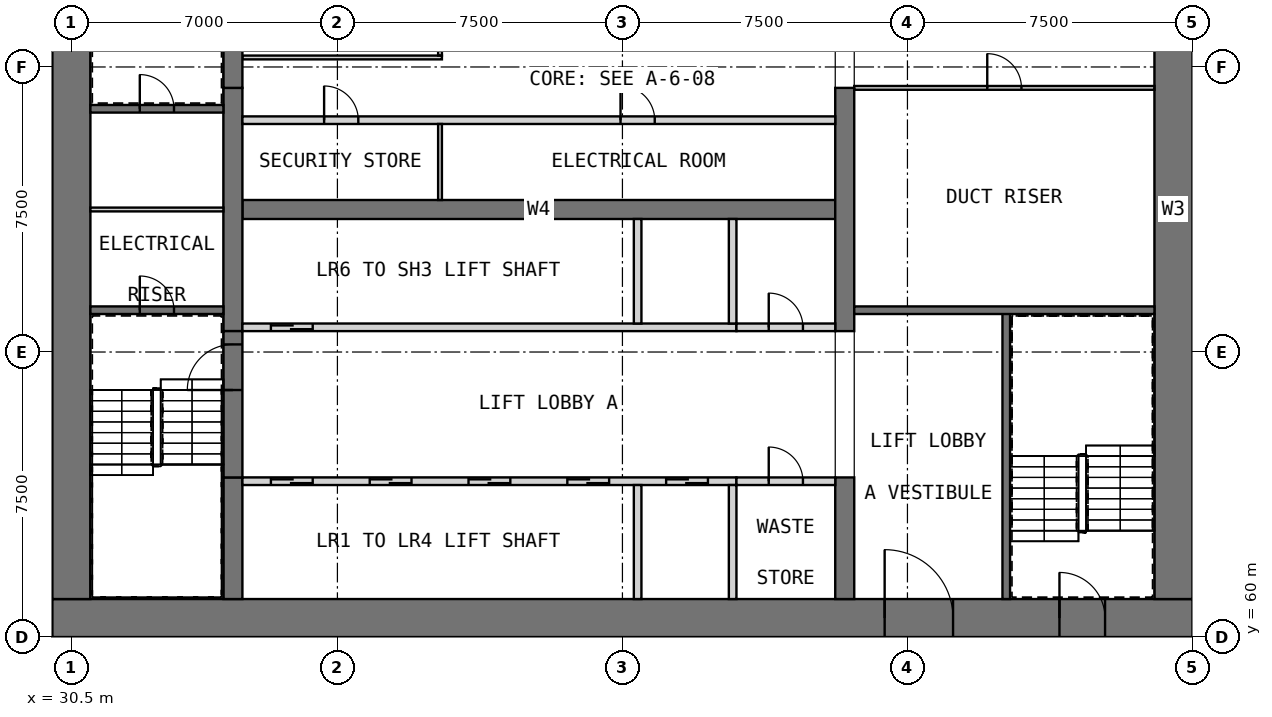
"""IFC4 building model, lengths in metres.
Left out: names, types, materials, properties, quantities, classifications, styles, units other than length and angle.
Written with IfcOpenShell. Run it as: python <this file> out.ifc"""

import sys

from ifc_helpers import new_model, si_unit, direction, frame, frame_2d, origin, place, context, subcontext, project, spatial, rectangle, extrude, element, fill, save


model = new_model("IFC4")
c1 = context("Model", 3, precision=1e-05, world=origin(), true_north=direction((0.0, 1.0)))
c2 = subcontext(c1, "Body", "Model", "MODEL_VIEW")
j1 = project(units=[si_unit("LENGTHUNIT", "METRE"), si_unit("PLANEANGLEUNIT", "RADIAN")], contexts=[c1])
p1 = place(None, origin())
s1 = spatial("IfcSite", under=j1, at=p1, CompositionType="ELEMENT")
p2 = place(p1, origin())
s2 = spatial("IfcBuilding", under=s1, at=p2, CompositionType="ELEMENT")
p3 = place(p2, frame((0.0, 0.0, 29.0)))
s3 = spatial("IfcBuildingStorey", under=s2, at=p3, CompositionType="ELEMENT", Elevation=29.0)
p4 = place(p3, frame((30.0, 60.5, 0.0), z_axis=(0.0, 0.0, 1.0), x_axis=(1.0, 0.0, 0.0)))
e1 = element("IfcWall", 1, at=p4, inside=s3, PredefinedType="SHEAR", context=c2, shape_type="SweptSolid", body=[
    extrude(rectangle(XDim=30.0, YDim=1.0, at=frame_2d((15.0, 0.0))), origin(), (0.0, 0.0, 1.0), 5.0),
])
p5 = place(p4, frame((21.9, 0.0, 0.0)))
e2 = element("IfcOpeningElement", 2, at=p5, cuts=e1, PredefinedType="OPENING", context=c2, shape_type="SweptSolid", body=[
    extrude(rectangle(XDim=1.8, YDim=2.1, at=frame_2d((0.9, 1.05))), frame((0.0, 0.51, 0.0), z_axis=(0.0, -1.0, 0.0), x_axis=(1.0, 0.0, 0.0)), (0.0, 0.0, 1.0), 1.02),
])
p6 = place(p4, frame((26.5, 0.0, 0.0)))
e3 = element("IfcOpeningElement", 3, at=p6, cuts=e1, PredefinedType="OPENING", context=c2, shape_type="SweptSolid", body=[
    extrude(rectangle(XDim=1.2, YDim=2.1, at=frame_2d((0.6, 1.05))), frame((0.0, 0.51, 0.0), z_axis=(0.0, -1.0, 0.0), x_axis=(1.0, 0.0, 0.0)), (0.0, 0.0, 1.0), 1.02),
])
p7 = place(p3, frame((30.5, 61.0, 0.0), z_axis=(0.0, 0.0, 1.0), x_axis=(0.0, 1.0, 0.0)))
e4 = element("IfcWall", 4, at=p7, inside=s3, PredefinedType="SHEAR", context=c2, shape_type="SweptSolid", body=[
    extrude(rectangle(XDim=20.5, YDim=1.0, at=frame_2d((10.25, 0.0))), origin(), (0.0, 0.0, 1.0), 5.0),
])
p8 = place(p3, frame((59.5, 61.0, 0.0), z_axis=(0.0, 0.0, 1.0), x_axis=(0.0, 1.0, 0.0)))
e5 = element("IfcWall", 5, at=p8, inside=s3, PredefinedType="SHEAR", context=c2, shape_type="SweptSolid", body=[
    extrude(rectangle(XDim=20.5, YDim=1.0, at=frame_2d((10.25, 0.0))), origin(), (0.0, 0.0, 1.0), 5.0),
])
p9 = place(p8, frame((14.5, 0.0, 0.0)))
e6 = element("IfcOpeningElement", 6, at=p9, cuts=e5, PredefinedType="OPENING", context=c2, shape_type="SweptSolid", body=[
    extrude(rectangle(XDim=1.8, YDim=2.1, at=frame_2d((0.9, 1.05))), frame((0.0, 0.51, 0.0), z_axis=(0.0, -1.0, 0.0), x_axis=(1.0, 0.0, 0.0)), (0.0, 0.0, 1.0), 1.02),
])
p10 = place(p3, frame((35.0, 71.25, 0.0), z_axis=(0.0, 0.0, 1.0), x_axis=(1.0, 0.0, 0.0)))
e7 = element("IfcWall", 7, at=p10, inside=s3, PredefinedType="SHEAR", context=c2, shape_type="SweptSolid", body=[
    extrude(rectangle(XDim=15.6, YDim=0.5, at=frame_2d((7.8, 0.0))), origin(), (0.0, 0.0, 1.0), 5.0),
])
p11 = place(p3, frame((34.75, 61.0, 0.0), z_axis=(0.0, 0.0, 1.0), x_axis=(0.0, 1.0, 0.0)))
e8 = element("IfcWall", 8, at=p11, inside=s3, PredefinedType="SHEAR", context=c2, shape_type="SweptSolid", body=[
    extrude(rectangle(XDim=3.2, YDim=0.5, at=frame_2d((1.6, 0.0))), origin(), (0.0, 0.0, 1.0), 5.0),
])
p12 = place(p3, frame((34.75, 68.05, 0.0), z_axis=(0.0, 0.0, 1.0), x_axis=(0.0, 1.0, 0.0)))
e9 = element("IfcWall", 9, at=p12, inside=s3, PredefinedType="SHEAR", context=c2, shape_type="SweptSolid", body=[
    extrude(rectangle(XDim=6.4, YDim=0.5, at=frame_2d((3.2, 0.0))), origin(), (0.0, 0.0, 1.0), 5.0),
])
p13 = place(p3, frame((50.85, 61.0, 0.0), z_axis=(0.0, 0.0, 1.0), x_axis=(0.0, 1.0, 0.0)))
e10 = element("IfcWall", 10, at=p13, inside=s3, PredefinedType="SHEAR", context=c2, shape_type="SweptSolid", body=[
    extrude(rectangle(XDim=3.2, YDim=0.5, at=frame_2d((1.6, 0.0))), origin(), (0.0, 0.0, 1.0), 5.0),
])
p14 = place(p3, frame((50.85, 68.05, 0.0), z_axis=(0.0, 0.0, 1.0), x_axis=(0.0, 1.0, 0.0)))
e11 = element("IfcWall", 11, at=p14, inside=s3, PredefinedType="SHEAR", context=c2, shape_type="SweptSolid", body=[
    extrude(rectangle(XDim=6.4, YDim=0.5, at=frame_2d((3.2, 0.0))), origin(), (0.0, 0.0, 1.0), 5.0),
])
p15 = place(p3, frame((35.0, 64.1, 0.0), z_axis=(0.0, 0.0, 1.0), x_axis=(1.0, 0.0, 0.0)))
e12 = element("IfcWall", 12, at=p15, inside=s3, PredefinedType="SOLIDWALL", context=c2, shape_type="SweptSolid", body=[
    extrude(rectangle(XDim=13.0, YDim=0.2, at=frame_2d((6.5, 0.0))), origin(), (0.0, 0.0, 1.0), 5.0),
])
p16 = place(p15, frame((0.75, 0.0, 0.0)))
e13 = element("IfcOpeningElement", 13, at=p16, cuts=e12, PredefinedType="OPENING", context=c2, shape_type="SweptSolid", body=[
    extrude(rectangle(XDim=1.1, YDim=2.1, at=frame_2d((0.55, 1.05))), frame((0.0, 0.11, 0.0), z_axis=(0.0, -1.0, 0.0), x_axis=(1.0, 0.0, 0.0)), (0.0, 0.0, 1.0), 0.22),
])
p17 = place(p15, frame((3.35, 0.0, 0.0)))
e14 = element("IfcOpeningElement", 14, at=p17, cuts=e12, PredefinedType="OPENING", context=c2, shape_type="SweptSolid", body=[
    extrude(rectangle(XDim=1.1, YDim=2.1, at=frame_2d((0.55, 1.05))), frame((0.0, 0.11, 0.0), z_axis=(0.0, -1.0, 0.0), x_axis=(1.0, 0.0, 0.0)), (0.0, 0.0, 1.0), 0.22),
])
p18 = place(p15, frame((5.95, 0.0, 0.0)))
e15 = element("IfcOpeningElement", 15, at=p18, cuts=e12, PredefinedType="OPENING", context=c2, shape_type="SweptSolid", body=[
    extrude(rectangle(XDim=1.1, YDim=2.1, at=frame_2d((0.55, 1.05))), frame((0.0, 0.11, 0.0), z_axis=(0.0, -1.0, 0.0), x_axis=(1.0, 0.0, 0.0)), (0.0, 0.0, 1.0), 0.22),
])
p19 = place(p15, frame((8.55, 0.0, 0.0)))
e16 = element("IfcOpeningElement", 16, at=p19, cuts=e12, PredefinedType="OPENING", context=c2, shape_type="SweptSolid", body=[
    extrude(rectangle(XDim=1.1, YDim=2.1, at=frame_2d((0.55, 1.05))), frame((0.0, 0.11, 0.0), z_axis=(0.0, -1.0, 0.0), x_axis=(1.0, 0.0, 0.0)), (0.0, 0.0, 1.0), 0.22),
])
p20 = place(p15, frame((11.15, 0.0, 0.0)))
e17 = element("IfcOpeningElement", 17, at=p20, cuts=e12, PredefinedType="OPENING", context=c2, shape_type="SweptSolid", body=[
    extrude(rectangle(XDim=1.1, YDim=2.1, at=frame_2d((0.55, 1.05))), frame((0.0, 0.11, 0.0), z_axis=(0.0, -1.0, 0.0), x_axis=(1.0, 0.0, 0.0)), (0.0, 0.0, 1.0), 0.22),
])
for number, where, z_axis, x_axis in (
    (18, (45.4, 61.0, 0.0), (0.0, 0.0, 1.0), (0.0, 1.0, 0.0)),
    (19, (47.9, 61.0, 0.0), (0.0, 0.0, 1.0), (0.0, 1.0, 0.0)),
):
    element("IfcWall", number, at=place(p3, frame(where, z_axis=z_axis, x_axis=x_axis)), inside=s3, PredefinedType="SOLIDWALL", context=c2, shape_type="SweptSolid", body=[
        extrude(rectangle(XDim=3.0, YDim=0.2, at=frame_2d((1.5, 0.0))), origin(), (0.0, 0.0, 1.0), 5.0),
    ])
p21 = place(p3, frame((48.0, 64.1, 0.0), z_axis=(0.0, 0.0, 1.0), x_axis=(1.0, 0.0, 0.0)))
e20 = element("IfcWall", 20, at=p21, inside=s3, PredefinedType="PARTITIONING", context=c2, shape_type="SweptSolid", body=[
    extrude(rectangle(XDim=2.6, YDim=0.2, at=frame_2d((1.3, 0.0))), origin(), (0.0, 0.0, 1.0), 4.75),
])
p22 = place(p21, frame((0.85, 0.0, 0.0)))
e21 = element("IfcOpeningElement", 21, at=p22, cuts=e20, PredefinedType="OPENING", context=c2, shape_type="SweptSolid", body=[
    extrude(rectangle(XDim=0.9, YDim=2.1, at=frame_2d((0.45, 1.05))), frame((0.0, 0.11, 0.0), z_axis=(0.0, -1.0, 0.0), x_axis=(1.0, 0.0, 0.0)), (0.0, 0.0, 1.0), 0.22),
])
p23 = place(p3, frame((35.0, 68.15, 0.0), z_axis=(0.0, 0.0, 1.0), x_axis=(1.0, 0.0, 0.0)))
e22 = element("IfcWall", 22, at=p23, inside=s3, PredefinedType="SOLIDWALL", context=c2, shape_type="SweptSolid", body=[
    extrude(rectangle(XDim=13.0, YDim=0.2, at=frame_2d((6.5, 0.0))), origin(), (0.0, 0.0, 1.0), 5.0),
])
p24 = place(p23, frame((0.75, 0.0, 0.0)))
e23 = element("IfcOpeningElement", 23, at=p24, cuts=e22, PredefinedType="OPENING", context=c2, shape_type="SweptSolid", body=[
    extrude(rectangle(XDim=1.1, YDim=2.1, at=frame_2d((0.55, 1.05))), frame((0.0, 0.11, 0.0), z_axis=(0.0, -1.0, 0.0), x_axis=(1.0, 0.0, 0.0)), (0.0, 0.0, 1.0), 0.22),
])
for number, where, z_axis, x_axis in (
    (24, (45.4, 68.25, 0.0), (0.0, 0.0, 1.0), (0.0, 1.0, 0.0)),
    (25, (47.9, 68.25, 0.0), (0.0, 0.0, 1.0), (0.0, 1.0, 0.0)),
):
    element("IfcWall", number, at=place(p3, frame(where, z_axis=z_axis, x_axis=x_axis)), inside=s3, PredefinedType="SOLIDWALL", context=c2, shape_type="SweptSolid", body=[
        extrude(rectangle(XDim=2.75, YDim=0.2, at=frame_2d((1.375, 0.0))), origin(), (0.0, 0.0, 1.0), 5.0),
    ])
p25 = place(p3, frame((48.0, 68.15, 0.0), z_axis=(0.0, 0.0, 1.0), x_axis=(1.0, 0.0, 0.0)))
e26 = element("IfcWall", 26, at=p25, inside=s3, PredefinedType="PARTITIONING", context=c2, shape_type="SweptSolid", body=[
    extrude(rectangle(XDim=2.6, YDim=0.2, at=frame_2d((1.3, 0.0))), origin(), (0.0, 0.0, 1.0), 4.75),
])
p26 = place(p25, frame((0.85, 0.0, 0.0)))
e27 = element("IfcOpeningElement", 27, at=p26, cuts=e26, PredefinedType="OPENING", context=c2, shape_type="SweptSolid", body=[
    extrude(rectangle(XDim=0.9, YDim=2.1, at=frame_2d((0.45, 1.05))), frame((0.0, 0.11, 0.0), z_axis=(0.0, -1.0, 0.0), x_axis=(1.0, 0.0, 0.0)), (0.0, 0.0, 1.0), 0.22),
])
p27 = place(p3, frame((35.0, 73.6, 0.0), z_axis=(0.0, 0.0, 1.0), x_axis=(1.0, 0.0, 0.0)))
e28 = element("IfcWall", 28, at=p27, inside=s3, PredefinedType="PARTITIONING", context=c2, shape_type="SweptSolid", body=[
    extrude(rectangle(XDim=15.6, YDim=0.2, at=frame_2d((7.8, 0.0))), origin(), (0.0, 0.0, 1.0), 4.75),
])
p28 = place(p27, frame((2.15, 0.0, 0.0)))
e29 = element("IfcOpeningElement", 29, at=p28, cuts=e28, PredefinedType="OPENING", context=c2, shape_type="SweptSolid", body=[
    extrude(rectangle(XDim=0.9, YDim=2.1, at=frame_2d((0.45, 1.05))), frame((0.0, 0.11, 0.0), z_axis=(0.0, -1.0, 0.0), x_axis=(1.0, 0.0, 0.0)), (0.0, 0.0, 1.0), 0.22),
])
p29 = place(p27, frame((9.95, 0.0, 0.0)))
e30 = element("IfcOpeningElement", 30, at=p29, cuts=e28, PredefinedType="OPENING", context=c2, shape_type="SweptSolid", body=[
    extrude(rectangle(XDim=0.9, YDim=2.1, at=frame_2d((0.45, 1.05))), frame((0.0, 0.11, 0.0), z_axis=(0.0, -1.0, 0.0), x_axis=(1.0, 0.0, 0.0)), (0.0, 0.0, 1.0), 0.22),
])
p30 = place(p3, frame((40.2, 71.5, 0.0), z_axis=(0.0, 0.0, 1.0), x_axis=(0.0, 1.0, 0.0)))
e31 = element("IfcWall", 31, at=p30, inside=s3, PredefinedType="PARTITIONING", context=c2, shape_type="SweptSolid", body=[
    extrude(rectangle(XDim=2.0, YDim=0.1, at=frame_2d((1.0, 0.0))), origin(), (0.0, 0.0, 1.0), 4.75),
])
p31 = place(p3, frame((35.0, 75.25, 0.0), z_axis=(0.0, 0.0, 1.0), x_axis=(1.0, 0.0, 0.0)))
e32 = element("IfcWall", 32, at=p31, inside=s3, PredefinedType="PARTITIONING", context=c2, shape_type="SweptSolid", body=[
    extrude(rectangle(XDim=5.25, YDim=0.1, at=frame_2d((2.625, 0.0))), origin(), (0.0, 0.0, 1.0), 4.75),
])
p32 = place(p3, frame((40.2, 75.3, 0.0), z_axis=(0.0, 0.0, 1.0), x_axis=(0.0, 1.0, 0.0)))
e33 = element("IfcWall", 33, at=p32, inside=s3, PredefinedType="PARTITIONING", context=c2, shape_type="SweptSolid", body=[
    extrude(rectangle(XDim=3.0, YDim=0.1, at=frame_2d((1.5, 0.0))), origin(), (0.0, 0.0, 1.0), 4.75),
])
p33 = place(p32, frame((1.2, 0.0, 0.0)))
e34 = element("IfcOpeningElement", 34, at=p33, cuts=e33, PredefinedType="OPENING", context=c2, shape_type="SweptSolid", body=[
    extrude(rectangle(XDim=1.1, YDim=2.1, at=frame_2d((0.55, 1.05))), frame((0.0, 0.06, 0.0), z_axis=(0.0, -1.0, 0.0), x_axis=(1.0, 0.0, 0.0)), (0.0, 0.0, 1.0), 0.12),
])
p34 = place(p3, frame((34.75, 64.2, 0.0), z_axis=(0.0, 0.0, 1.0), x_axis=(0.0, 1.0, 0.0)))
e35 = element("IfcWall", 35, at=p34, inside=s3, PredefinedType="SOLIDWALL", context=c2, shape_type="SweptSolid", body=[
    extrude(rectangle(XDim=3.85, YDim=0.5, at=frame_2d((1.925, 0.0))), origin(), (0.0, 0.0, 1.0), 3.8),
])
p35 = place(p34, frame((2.3, 0.0, 0.0)))
e36 = element("IfcOpeningElement", 36, at=p35, cuts=e35, PredefinedType="OPENING", context=c2, shape_type="SweptSolid", body=[
    extrude(rectangle(XDim=1.2, YDim=2.1, at=frame_2d((0.6, 1.05))), frame((0.0, 0.26, 0.0), z_axis=(0.0, -1.0, 0.0), x_axis=(1.0, 0.0, 0.0)), (0.0, 0.0, 1.0), 0.52),
])
p36 = place(p3, frame((34.75, 74.45, 0.0), z_axis=(0.0, 0.0, 1.0), x_axis=(0.0, 1.0, 0.0)))
e37 = element("IfcWall", 37, at=p36, inside=s3, PredefinedType="SOLIDWALL", context=c2, shape_type="SweptSolid", body=[
    extrude(rectangle(XDim=3.85, YDim=0.5, at=frame_2d((1.925, 0.0))), origin(), (0.0, 0.0, 1.0), 3.8),
])
p37 = place(p36, frame((1.0, 0.0, 0.0)))
e38 = element("IfcOpeningElement", 38, at=p37, cuts=e37, PredefinedType="OPENING", context=c2, shape_type="SweptSolid", body=[
    extrude(rectangle(XDim=1.2, YDim=2.1, at=frame_2d((0.6, 1.05))), frame((0.0, 0.26, 0.0), z_axis=(0.0, -1.0, 0.0), x_axis=(1.0, 0.0, 0.0)), (0.0, 0.0, 1.0), 0.52),
])
p38 = place(p3, frame((31.0, 68.6, 0.0), z_axis=(0.0, 0.0, 1.0), x_axis=(1.0, 0.0, 0.0)))
e39 = element("IfcWall", 39, at=p38, inside=s3, PredefinedType="SOLIDWALL", context=c2, shape_type="SweptSolid", body=[
    extrude(rectangle(XDim=3.5, YDim=0.2, at=frame_2d((1.75, 0.0))), origin(), (0.0, 0.0, 1.0), 4.75),
])
p39 = place(p38, frame((1.3, 0.0, 0.0)))
e40 = element("IfcOpeningElement", 40, at=p39, cuts=e39, PredefinedType="OPENING", context=c2, shape_type="SweptSolid", body=[
    extrude(rectangle(XDim=0.9, YDim=2.1, at=frame_2d((0.45, 1.05))), frame((0.0, 0.11, 0.0), z_axis=(0.0, -1.0, 0.0), x_axis=(1.0, 0.0, 0.0)), (0.0, 0.0, 1.0), 0.22),
])
p40 = place(p3, frame((31.0, 73.9, 0.0), z_axis=(0.0, 0.0, 1.0), x_axis=(1.0, 0.0, 0.0)))
e41 = element("IfcWall", 41, at=p40, inside=s3, PredefinedType="SOLIDWALL", context=c2, shape_type="SweptSolid", body=[
    extrude(rectangle(XDim=3.5, YDim=0.2, at=frame_2d((1.75, 0.0))), origin(), (0.0, 0.0, 1.0), 4.75),
])
p41 = place(p40, frame((1.3, 0.0, 0.0)))
e42 = element("IfcOpeningElement", 42, at=p41, cuts=e41, PredefinedType="OPENING", context=c2, shape_type="SweptSolid", body=[
    extrude(rectangle(XDim=0.9, YDim=2.1, at=frame_2d((0.45, 1.05))), frame((0.0, 0.11, 0.0), z_axis=(0.0, -1.0, 0.0), x_axis=(1.0, 0.0, 0.0)), (0.0, 0.0, 1.0), 0.22),
])
p42 = place(p3, frame((55.1, 61.0, 0.0), z_axis=(0.0, 0.0, 1.0), x_axis=(0.0, 1.0, 0.0)))
e43 = element("IfcWall", 43, at=p42, inside=s3, PredefinedType="SOLIDWALL", context=c2, shape_type="SweptSolid", body=[
    extrude(rectangle(XDim=7.6, YDim=0.2, at=frame_2d((3.8, 0.0))), origin(), (0.0, 0.0, 1.0), 4.75),
])
p43 = place(p3, frame((51.1, 68.6, 0.0), z_axis=(0.0, 0.0, 1.0), x_axis=(1.0, 0.0, 0.0)))
e44 = element("IfcWall", 44, at=p43, inside=s3, PredefinedType="SOLIDWALL", context=c2, shape_type="SweptSolid", body=[
    extrude(rectangle(XDim=7.9, YDim=0.2, at=frame_2d((3.95, 0.0))), origin(), (0.0, 0.0, 1.0), 4.75),
])
p44 = place(p3, frame((31.0, 71.25, 0.0), z_axis=(0.0, 0.0, 1.0), x_axis=(1.0, 0.0, 0.0)))
e45 = element("IfcWall", 45, at=p44, inside=s3, PredefinedType="PARTITIONING", context=c2, shape_type="SweptSolid", body=[
    extrude(rectangle(XDim=3.5, YDim=0.1, at=frame_2d((1.75, 0.0))), origin(), (0.0, 0.0, 1.0), 4.75),
])
p45 = place(p3, frame((51.1, 74.45, 0.0), z_axis=(0.0, 0.0, 1.0), x_axis=(1.0, 0.0, 0.0)))
e46 = element("IfcWall", 46, at=p45, inside=s3, PredefinedType="PARTITIONING", context=c2, shape_type="SweptSolid", body=[
    extrude(rectangle(XDim=7.9, YDim=0.1, at=frame_2d((3.95, 0.0))), origin(), (0.0, 0.0, 1.0), 4.75),
])
p46 = place(p45, frame((3.5, 0.0, 0.0)))
e47 = element("IfcOpeningElement", 47, at=p46, cuts=e46, PredefinedType="OPENING", context=c2, shape_type="SweptSolid", body=[
    extrude(rectangle(XDim=0.9, YDim=2.1, at=frame_2d((0.45, 1.05))), frame((0.0, 0.06, 0.0), z_axis=(0.0, -1.0, 0.0), x_axis=(1.0, 0.0, 0.0)), (0.0, 0.0, 1.0), 0.12),
])
p47 = place(p16, origin())
e48 = element("IfcDoor", 48, at=p47, inside=s3, OperationType="DOUBLE_DOOR_SLIDING", PredefinedType="DOOR", context=c2, shape_type="SweptSolid", body=[
    extrude(rectangle(XDim=1.1, YDim=2.1, at=frame_2d((0.55, 1.05))), frame((0.0, 0.025, 0.0), z_axis=(0.0, -1.0, 0.0), x_axis=(1.0, 0.0, 0.0)), (0.0, 0.0, 1.0), 0.05),
])
fill(e13, e48)
p48 = place(p17, origin())
e49 = element("IfcDoor", 49, at=p48, inside=s3, OperationType="DOUBLE_DOOR_SLIDING", PredefinedType="DOOR", context=c2, shape_type="SweptSolid", body=[
    extrude(rectangle(XDim=1.1, YDim=2.1, at=frame_2d((0.55, 1.05))), frame((0.0, 0.025, 0.0), z_axis=(0.0, -1.0, 0.0), x_axis=(1.0, 0.0, 0.0)), (0.0, 0.0, 1.0), 0.05),
])
fill(e14, e49)
p49 = place(p18, origin())
e50 = element("IfcDoor", 50, at=p49, inside=s3, OperationType="DOUBLE_DOOR_SLIDING", PredefinedType="DOOR", context=c2, shape_type="SweptSolid", body=[
    extrude(rectangle(XDim=1.1, YDim=2.1, at=frame_2d((0.55, 1.05))), frame((0.0, 0.025, 0.0), z_axis=(0.0, -1.0, 0.0), x_axis=(1.0, 0.0, 0.0)), (0.0, 0.0, 1.0), 0.05),
])
fill(e15, e50)
p50 = place(p19, origin())
e51 = element("IfcDoor", 51, at=p50, inside=s3, OperationType="DOUBLE_DOOR_SLIDING", PredefinedType="DOOR", context=c2, shape_type="SweptSolid", body=[
    extrude(rectangle(XDim=1.1, YDim=2.1, at=frame_2d((0.55, 1.05))), frame((0.0, 0.025, 0.0), z_axis=(0.0, -1.0, 0.0), x_axis=(1.0, 0.0, 0.0)), (0.0, 0.0, 1.0), 0.05),
])
fill(e16, e51)
p51 = place(p20, origin())
e52 = element("IfcDoor", 52, at=p51, inside=s3, OperationType="DOUBLE_DOOR_SLIDING", PredefinedType="DOOR", context=c2, shape_type="SweptSolid", body=[
    extrude(rectangle(XDim=1.1, YDim=2.1, at=frame_2d((0.55, 1.05))), frame((0.0, 0.025, 0.0), z_axis=(0.0, -1.0, 0.0), x_axis=(1.0, 0.0, 0.0)), (0.0, 0.0, 1.0), 0.05),
])
fill(e17, e52)
p52 = place(p22, origin())
e53 = element("IfcDoor", 53, at=p52, inside=s3, OperationType="SINGLE_SWING_LEFT", PredefinedType="DOOR", context=c2, shape_type="SweptSolid", body=[
    extrude(rectangle(XDim=0.9, YDim=2.1, at=frame_2d((0.45, 1.05))), frame((0.0, 0.025, 0.0), z_axis=(0.0, -1.0, 0.0), x_axis=(1.0, 0.0, 0.0)), (0.0, 0.0, 1.0), 0.05),
])
fill(e21, e53)
p53 = place(p24, origin())
e54 = element("IfcDoor", 54, at=p53, inside=s3, OperationType="DOUBLE_DOOR_SLIDING", PredefinedType="DOOR", context=c2, shape_type="SweptSolid", body=[
    extrude(rectangle(XDim=1.1, YDim=2.1, at=frame_2d((0.55, 1.05))), frame((0.0, 0.025, 0.0), z_axis=(0.0, -1.0, 0.0), x_axis=(1.0, 0.0, 0.0)), (0.0, 0.0, 1.0), 0.05),
])
fill(e23, e54)
p54 = place(p26, origin())
e55 = element("IfcDoor", 55, at=p54, inside=s3, OperationType="SINGLE_SWING_LEFT", PredefinedType="DOOR", context=c2, shape_type="SweptSolid", body=[
    extrude(rectangle(XDim=0.9, YDim=2.1, at=frame_2d((0.45, 1.05))), frame((0.0, 0.025, 0.0), z_axis=(0.0, -1.0, 0.0), x_axis=(1.0, 0.0, 0.0)), (0.0, 0.0, 1.0), 0.05),
])
fill(e27, e55)
p55 = place(p28, origin())
e56 = element("IfcDoor", 56, at=p55, inside=s3, OperationType="SINGLE_SWING_LEFT", PredefinedType="DOOR", context=c2, shape_type="SweptSolid", body=[
    extrude(rectangle(XDim=0.9, YDim=2.1, at=frame_2d((0.45, 1.05))), frame((0.0, 0.025, 0.0), z_axis=(0.0, -1.0, 0.0), x_axis=(1.0, 0.0, 0.0)), (0.0, 0.0, 1.0), 0.05),
])
fill(e29, e56)
p56 = place(p29, origin())
e57 = element("IfcDoor", 57, at=p56, inside=s3, OperationType="SINGLE_SWING_RIGHT", PredefinedType="DOOR", context=c2, shape_type="SweptSolid", body=[
    extrude(rectangle(XDim=0.9, YDim=2.1, at=frame_2d((0.45, 1.05))), frame((0.0, 0.025, 0.0), z_axis=(0.0, -1.0, 0.0), x_axis=(1.0, 0.0, 0.0)), (0.0, 0.0, 1.0), 0.05),
])
fill(e30, e57)
p57 = place(p5, origin())
e58 = element("IfcDoor", 58, at=p57, inside=s3, OperationType="DOUBLE_DOOR_SINGLE_SWING", PredefinedType="DOOR", context=c2, shape_type="SweptSolid", body=[
    extrude(rectangle(XDim=1.8, YDim=2.1, at=frame_2d((0.9, 1.05))), frame((0.0, 0.025, 0.0), z_axis=(0.0, -1.0, 0.0), x_axis=(1.0, 0.0, 0.0)), (0.0, 0.0, 1.0), 0.05),
])
fill(e2, e58)
p58 = place(p35, origin())
e59 = element("IfcDoor", 59, at=p58, inside=s3, OperationType="SINGLE_SWING_LEFT", PredefinedType="DOOR", context=c2, shape_type="SweptSolid", body=[
    extrude(rectangle(XDim=1.2, YDim=2.1, at=frame_2d((0.6, 1.05))), frame((0.0, 0.025, 0.0), z_axis=(0.0, -1.0, 0.0), x_axis=(1.0, 0.0, 0.0)), (0.0, 0.0, 1.0), 0.05),
])
fill(e36, e59)
p59 = place(p39, origin())
e60 = element("IfcDoor", 60, at=p59, inside=s3, OperationType="SINGLE_SWING_LEFT", PredefinedType="DOOR", context=c2, shape_type="SweptSolid", body=[
    extrude(rectangle(XDim=0.9, YDim=2.1, at=frame_2d((0.45, 1.05))), frame((0.0, 0.025, 0.0), z_axis=(0.0, -1.0, 0.0), x_axis=(1.0, 0.0, 0.0)), (0.0, 0.0, 1.0), 0.05),
])
fill(e40, e60)
p60 = place(p41, origin())
e61 = element("IfcDoor", 61, at=p60, inside=s3, OperationType="SINGLE_SWING_RIGHT", PredefinedType="DOOR", context=c2, shape_type="SweptSolid", body=[
    extrude(rectangle(XDim=0.9, YDim=2.1, at=frame_2d((0.45, 1.05))), frame((0.0, 0.025, 0.0), z_axis=(0.0, -1.0, 0.0), x_axis=(1.0, 0.0, 0.0)), (0.0, 0.0, 1.0), 0.05),
])
fill(e42, e61)
p61 = place(p6, origin())
e62 = element("IfcDoor", 62, at=p61, inside=s3, OperationType="SINGLE_SWING_LEFT", PredefinedType="DOOR", context=c2, shape_type="SweptSolid", body=[
    extrude(rectangle(XDim=1.2, YDim=2.1, at=frame_2d((0.6, 1.05))), frame((0.0, 0.025, 0.0), z_axis=(0.0, -1.0, 0.0), x_axis=(1.0, 0.0, 0.0)), (0.0, 0.0, 1.0), 0.05),
])
fill(e3, e62)
p62 = place(p46, origin())
e63 = element("IfcDoor", 63, at=p62, inside=s3, OperationType="SINGLE_SWING_LEFT", PredefinedType="DOOR", context=c2, shape_type="SweptSolid", body=[
    extrude(rectangle(XDim=0.9, YDim=2.1, at=frame_2d((0.45, 1.05))), frame((0.0, 0.025, 0.0), z_axis=(0.0, -1.0, 0.0), x_axis=(1.0, 0.0, 0.0)), (0.0, 0.0, 1.0), 0.05),
])
fill(e47, e63)
save(model, sys.argv[1])
